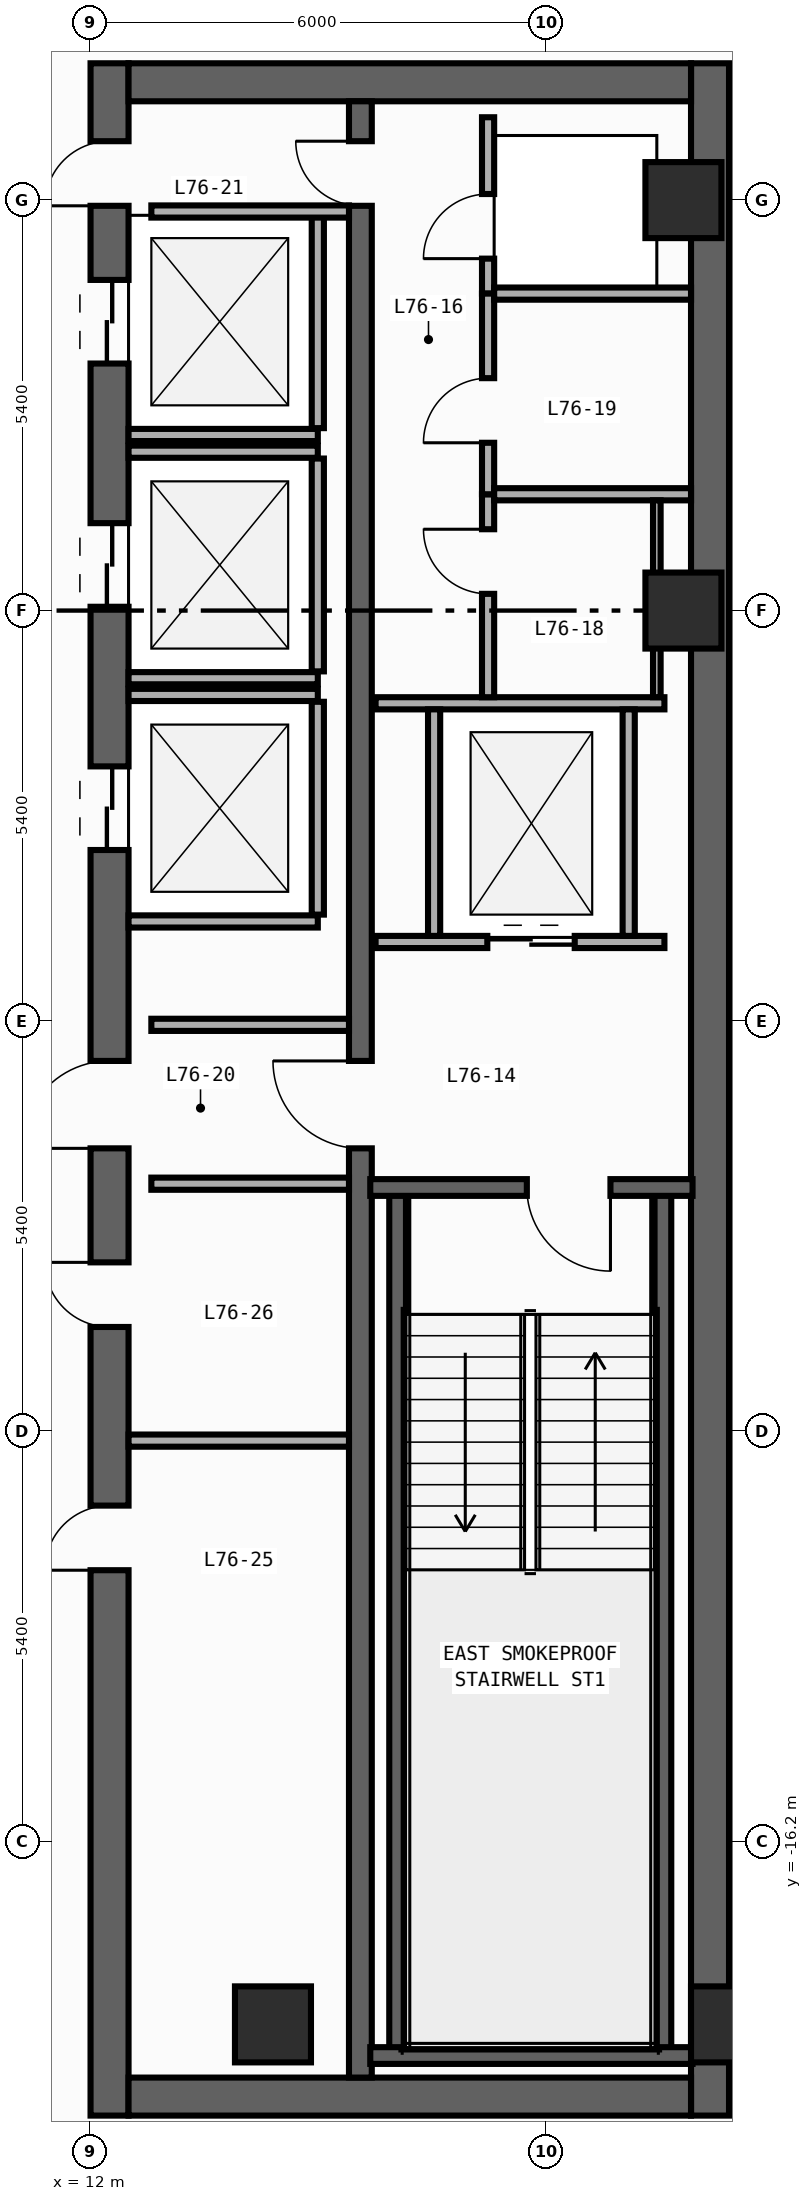
"""IFC4 building model, lengths in metres.
Left out: names, types, materials, properties, quantities, classifications, styles, units other than length and angle.
Written with IfcOpenShell. Run it as: python <this file> out.ifc"""

import sys

from ifc_helpers import new_model, si_unit, direction, frame, frame_2d, origin, origin_2d, place, context, subcontext, project, spatial, rectangle, circle, extrude, element, fill, save


model = new_model("IFC4")
c1 = context("Model", 3, precision=1e-05, world=origin(), true_north=direction((0.0, 1.0)))
c2 = subcontext(c1, "Body", "Model", "MODEL_VIEW")
j1 = project(units=[si_unit("LENGTHUNIT", "METRE"), si_unit("PLANEANGLEUNIT", "RADIAN")], contexts=[c1])
p1 = place(None, origin())
s1 = spatial("IfcSite", under=j1, at=p1, CompositionType="ELEMENT")
p2 = place(p1, origin())
s2 = spatial("IfcBuilding", under=s1, at=p2, CompositionType="ELEMENT")
p3 = place(p2, frame((0.0, 0.0, 315.6)))
s3 = spatial("IfcBuildingStorey", under=s2, at=p3, CompositionType="ELEMENT", Elevation=315.6)
p4 = place(p3, frame((12.25, -19.8, 0.0), z_axis=(0.0, 0.0, 1.0), x_axis=(0.0, 1.0, 0.0)))
e1 = element("IfcWall", 1, at=p4, inside=s3, PredefinedType="SHEAR", context=c2, shape_type="SweptSolid", body=[
    extrude(rectangle(XDim=27.0, YDim=0.5, at=frame_2d((13.5, 0.0))), origin(), (0.0, 0.0, 1.0), 4.54),
])
p5 = place(p4, frame((23.05, 0.0, 0.0)))
e2 = element("IfcOpeningElement", 2, at=p5, cuts=e1, PredefinedType="OPENING", context=c2, shape_type="SweptSolid", body=[
    extrude(rectangle(XDim=1.1, YDim=2.2, at=frame_2d((0.55, 1.1))), frame((0.0, 0.26, 0.0), z_axis=(0.0, -1.0, 0.0), x_axis=(1.0, 0.0, 0.0)), (0.0, 0.0, 1.0), 0.52),
])
p6 = place(p4, frame((19.85, 0.0, 0.0)))
e3 = element("IfcOpeningElement", 3, at=p6, cuts=e1, PredefinedType="OPENING", context=c2, shape_type="SweptSolid", body=[
    extrude(rectangle(XDim=1.1, YDim=2.2, at=frame_2d((0.55, 1.1))), frame((0.0, 0.26, 0.0), z_axis=(0.0, -1.0, 0.0), x_axis=(1.0, 0.0, 0.0)), (0.0, 0.0, 1.0), 0.52),
])
p7 = place(p4, frame((16.65, 0.0, 0.0)))
e4 = element("IfcOpeningElement", 4, at=p7, cuts=e1, PredefinedType="OPENING", context=c2, shape_type="SweptSolid", body=[
    extrude(rectangle(XDim=1.1, YDim=2.2, at=frame_2d((0.55, 1.1))), frame((0.0, 0.26, 0.0), z_axis=(0.0, -1.0, 0.0), x_axis=(1.0, 0.0, 0.0)), (0.0, 0.0, 1.0), 0.52),
])
p8 = place(p4, frame((7.175, 0.0, 0.0)))
e5 = element("IfcOpeningElement", 5, at=p8, cuts=e1, PredefinedType="OPENING", context=c2, shape_type="SweptSolid", body=[
    extrude(rectangle(XDim=0.85, YDim=2.1, at=frame_2d((0.425, 1.05))), frame((0.0, 0.26, 0.0), z_axis=(0.0, -1.0, 0.0), x_axis=(1.0, 0.0, 0.0)), (0.0, 0.0, 1.0), 0.52),
])
p9 = place(p4, frame((10.375, 0.0, 0.0)))
e6 = element("IfcOpeningElement", 6, at=p9, cuts=e1, PredefinedType="OPENING", context=c2, shape_type="SweptSolid", body=[
    extrude(rectangle(XDim=0.85, YDim=2.1, at=frame_2d((0.425, 1.05))), frame((0.0, 0.26, 0.0), z_axis=(0.0, -1.0, 0.0), x_axis=(1.0, 0.0, 0.0)), (0.0, 0.0, 1.0), 0.52),
])
p10 = place(p4, frame((12.725, 0.0, 0.0)))
e7 = element("IfcOpeningElement", 7, at=p10, cuts=e1, PredefinedType="OPENING", context=c2, shape_type="SweptSolid", body=[
    extrude(rectangle(XDim=1.15, YDim=2.2, at=frame_2d((0.575, 1.1))), frame((0.0, 0.26, 0.0), z_axis=(0.0, -1.0, 0.0), x_axis=(1.0, 0.0, 0.0)), (0.0, 0.0, 1.0), 0.52),
])
p11 = place(p4, frame((25.125, 0.0, 0.0)))
e8 = element("IfcOpeningElement", 8, at=p11, cuts=e1, PredefinedType="OPENING", context=c2, shape_type="SweptSolid", body=[
    extrude(rectangle(XDim=0.85, YDim=2.1, at=frame_2d((0.425, 1.05))), frame((0.0, 0.26, 0.0), z_axis=(0.0, -1.0, 0.0), x_axis=(1.0, 0.0, 0.0)), (0.0, 0.0, 1.0), 0.52),
])
p12 = place(p3, frame((20.15, -19.8, 0.0), z_axis=(0.0, 0.0, 1.0), x_axis=(0.0, 1.0, 0.0)))
e9 = element("IfcWall", 9, at=p12, inside=s3, PredefinedType="SHEAR", context=c2, shape_type="SweptSolid", body=[
    extrude(rectangle(XDim=27.0, YDim=0.5, at=frame_2d((13.5, 0.0))), origin(), (0.0, 0.0, 1.0), 4.54),
])
for number, where, z_axis, x_axis in (
    (10, (12.5, -19.55, 0.0), (0.0, 0.0, 1.0), (1.0, 0.0, 0.0)),
    (11, (12.5, 6.95, 0.0), (0.0, 0.0, 1.0), (1.0, 0.0, 0.0)),
):
    element("IfcWall", number, at=place(p3, frame(where, z_axis=z_axis, x_axis=x_axis)), inside=s3, PredefinedType="SHEAR", context=c2, shape_type="SweptSolid", body=[
        extrude(rectangle(XDim=7.4, YDim=0.5, at=frame_2d((3.7, 0.0))), origin(), (0.0, 0.0, 1.0), 4.54),
    ])
p13 = place(p3, frame((15.55, -19.3, 0.0), z_axis=(0.0, 0.0, 1.0), x_axis=(0.0, 1.0, 0.0)))
e12 = element("IfcWall", 12, at=p13, inside=s3, PredefinedType="SHEAR", context=c2, shape_type="SweptSolid", body=[
    extrude(rectangle(XDim=26.0, YDim=0.3, at=frame_2d((13.0, 0.0))), origin(), (0.0, 0.0, 1.0), 4.54),
])
p14 = place(p13, frame((12.225, 0.0, 0.0)))
e13 = element("IfcOpeningElement", 13, at=p14, cuts=e12, PredefinedType="OPENING", context=c2, shape_type="SweptSolid", body=[
    extrude(rectangle(XDim=1.15, YDim=2.2, at=frame_2d((0.575, 1.1))), frame((0.0, 0.16, 0.0), z_axis=(0.0, -1.0, 0.0), x_axis=(1.0, 0.0, 0.0)), (0.0, 0.0, 1.0), 0.32),
])
p15 = place(p13, frame((24.625, 0.0, 0.0)))
e14 = element("IfcOpeningElement", 14, at=p15, cuts=e12, PredefinedType="OPENING", context=c2, shape_type="SweptSolid", body=[
    extrude(rectangle(XDim=0.85, YDim=2.1, at=frame_2d((0.425, 1.05))), frame((0.0, 0.16, 0.0), z_axis=(0.0, -1.0, 0.0), x_axis=(1.0, 0.0, 0.0)), (0.0, 0.0, 1.0), 0.32),
])
for number, where, z_axis, x_axis in (
    (15, (16.04, -19.01, 0.0), (0.0, 0.0, 1.0), (0.0, 1.0, 0.0)),
    (16, (19.53, -19.01, 0.0), (0.0, 0.0, 1.0), (0.0, 1.0, 0.0)),
):
    element("IfcWall", number, at=place(p3, frame(where, z_axis=z_axis, x_axis=x_axis)), inside=s3, PredefinedType="SHEAR", context=c2, shape_type="SweptSolid", body=[
        extrude(rectangle(XDim=11.42, YDim=0.22, at=frame_2d((5.71, 0.0))), origin(), (0.0, 0.0, 1.0), 4.54),
    ])
p16 = place(p3, frame((15.68, -19.01, 0.0), z_axis=(0.0, 0.0, 1.0), x_axis=(1.0, 0.0, 0.0)))
e17 = element("IfcWall", 17, at=p16, inside=s3, PredefinedType="SHEAR", context=c2, shape_type="SweptSolid", body=[
    extrude(rectangle(XDim=4.24, YDim=0.22, at=frame_2d((2.12, 0.0))), origin(), (0.0, 0.0, 1.0), 4.54),
])
p17 = place(p3, frame((19.92, -7.59, 0.0), z_axis=(0.0, 0.0, 1.0), x_axis=(-1.0, 0.0, 0.0)))
e18 = element("IfcWall", 18, at=p17, inside=s3, PredefinedType="SHEAR", context=c2, shape_type="SweptSolid", body=[
    extrude(rectangle(XDim=4.24, YDim=0.22, at=frame_2d((2.12, 0.0))), origin(), (0.0, 0.0, 1.0), 4.54),
])
p18 = place(p17, frame((1.08, 0.0, 0.0)))
e19 = element("IfcOpeningElement", 19, at=p18, cuts=e18, PredefinedType="OPENING", context=c2, shape_type="SweptSolid", body=[
    extrude(rectangle(XDim=1.1, YDim=2.2, at=frame_2d((0.55, 1.1))), frame((0.0, 0.12, 0.0), z_axis=(0.0, -1.0, 0.0), x_axis=(1.0, 0.0, 0.0)), (0.0, 0.0, 1.0), 0.24),
])
for number, where, z_axis, x_axis in (
    (20, (20.4, -18.6, 0.0), (0.0, 0.0, 1.0), (1.0, 0.0, 0.0)),
    (21, (14.4, -18.6, 0.0), (0.0, 0.0, 1.0), (1.0, 0.0, 0.0)),
    (22, (19.8, 0.0, 0.0), (0.0, 0.0, 1.0), (1.0, 0.0, 0.0)),
    (23, (19.8, 5.4, 0.0), (0.0, 0.0, 1.0), (1.0, 0.0, 0.0)),
):
    element("IfcColumn", number, at=place(p3, frame(where, z_axis=z_axis, x_axis=x_axis)), inside=s3, PredefinedType="COLUMN", context=c2, shape_type="SweptSolid", body=[
        extrude(circle(Radius=0.5, at=origin_2d()), origin(), (0.0, 0.0, 1.0), 4.8),
    ])
p19 = place(p3, frame((12.5, 2.31, 0.0), z_axis=(0.0, 0.0, 1.0), x_axis=(1.0, 0.0, 0.0)))
e24 = element("IfcWall", 24, at=p19, inside=s3, PredefinedType="STANDARD", context=c2, shape_type="SweptSolid", body=[
    extrude(rectangle(XDim=2.49, YDim=0.16, at=frame_2d((1.245, 0.0))), origin(), (0.0, 0.0, 1.0), 4.54),
])
p20 = place(p3, frame((14.99, 2.4, 0.0), z_axis=(0.0, 0.0, 1.0), x_axis=(0.0, 1.0, 0.0)))
e25 = element("IfcWall", 25, at=p20, inside=s3, PredefinedType="STANDARD", context=c2, shape_type="SweptSolid", body=[
    extrude(rectangle(XDim=2.8, YDim=0.16, at=frame_2d((1.4, 0.0))), origin(), (0.0, 0.0, 1.0), 4.54),
])
for number, where, z_axis, x_axis in (
    (26, (12.5, -0.89, 0.0), (0.0, 0.0, 1.0), (1.0, 0.0, 0.0)),
    (27, (12.5, 2.09, 0.0), (0.0, 0.0, 1.0), (1.0, 0.0, 0.0)),
):
    element("IfcWall", number, at=place(p3, frame(where, z_axis=z_axis, x_axis=x_axis)), inside=s3, PredefinedType="STANDARD", context=c2, shape_type="SweptSolid", body=[
        extrude(rectangle(XDim=2.49, YDim=0.16, at=frame_2d((1.245, 0.0))), origin(), (0.0, 0.0, 1.0), 4.54),
    ])
p21 = place(p3, frame((14.99, -0.8, 0.0), z_axis=(0.0, 0.0, 1.0), x_axis=(0.0, 1.0, 0.0)))
e28 = element("IfcWall", 28, at=p21, inside=s3, PredefinedType="STANDARD", context=c2, shape_type="SweptSolid", body=[
    extrude(rectangle(XDim=2.8, YDim=0.16, at=frame_2d((1.4, 0.0))), origin(), (0.0, 0.0, 1.0), 4.54),
])
for number, where, z_axis, x_axis in (
    (29, (12.5, -4.09, 0.0), (0.0, 0.0, 1.0), (1.0, 0.0, 0.0)),
    (30, (12.5, -1.11, 0.0), (0.0, 0.0, 1.0), (1.0, 0.0, 0.0)),
):
    element("IfcWall", number, at=place(p3, frame(where, z_axis=z_axis, x_axis=x_axis)), inside=s3, PredefinedType="STANDARD", context=c2, shape_type="SweptSolid", body=[
        extrude(rectangle(XDim=2.49, YDim=0.16, at=frame_2d((1.245, 0.0))), origin(), (0.0, 0.0, 1.0), 4.54),
    ])
p22 = place(p3, frame((14.99, -4.0, 0.0), z_axis=(0.0, 0.0, 1.0), x_axis=(0.0, 1.0, 0.0)))
e31 = element("IfcWall", 31, at=p22, inside=s3, PredefinedType="STANDARD", context=c2, shape_type="SweptSolid", body=[
    extrude(rectangle(XDim=2.8, YDim=0.16, at=frame_2d((1.4, 0.0))), origin(), (0.0, 0.0, 1.0), 4.54),
])
p23 = place(p3, frame((15.75, -4.36, 0.0), z_axis=(0.0, 0.0, 1.0), x_axis=(1.0, 0.0, 0.0)))
e32 = element("IfcWall", 32, at=p23, inside=s3, PredefinedType="STANDARD", context=c2, shape_type="SweptSolid", body=[
    extrude(rectangle(XDim=3.8, YDim=0.16, at=frame_2d((1.9, 0.0))), origin(), (0.0, 0.0, 1.0), 4.54),
])
p24 = place(p23, frame((1.47, 0.0, 0.0)))
e33 = element("IfcOpeningElement", 33, at=p24, cuts=e32, PredefinedType="OPENING", context=c2, shape_type="SweptSolid", body=[
    extrude(rectangle(XDim=1.15, YDim=2.2, at=frame_2d((0.575, 1.1))), frame((0.0, 0.09, 0.0), z_axis=(0.0, -1.0, 0.0), x_axis=(1.0, 0.0, 0.0)), (0.0, 0.0, 1.0), 0.18),
])
p25 = place(p3, frame((15.75, -1.22, 0.0), z_axis=(0.0, 0.0, 1.0), x_axis=(1.0, 0.0, 0.0)))
e34 = element("IfcWall", 34, at=p25, inside=s3, PredefinedType="STANDARD", context=c2, shape_type="SweptSolid", body=[
    extrude(rectangle(XDim=3.8, YDim=0.16, at=frame_2d((1.9, 0.0))), origin(), (0.0, 0.0, 1.0), 4.54),
])
for number, where, z_axis, x_axis in (
    (35, (16.52, -4.28, 0.0), (0.0, 0.0, 1.0), (0.0, 1.0, 0.0)),
    (36, (19.08, -4.28, 0.0), (0.0, 0.0, 1.0), (0.0, 1.0, 0.0)),
):
    element("IfcWall", number, at=place(p3, frame(where, z_axis=z_axis, x_axis=x_axis)), inside=s3, PredefinedType="STANDARD", context=c2, shape_type="SweptSolid", body=[
        extrude(rectangle(XDim=2.98, YDim=0.16, at=frame_2d((1.49, 0.0))), origin(), (0.0, 0.0, 1.0), 4.54),
    ])
for number, where, z_axis, x_axis in (
    (37, (12.8, -5.45, 0.0), (0.0, 0.0, 1.0), (1.0, 0.0, 0.0)),
    (38, (12.8, -7.54, 0.0), (0.0, 0.0, 1.0), (1.0, 0.0, 0.0)),
    (39, (12.8, 5.25, 0.0), (0.0, 0.0, 1.0), (1.0, 0.0, 0.0)),
):
    element("IfcWall", number, at=place(p3, frame(where, z_axis=z_axis, x_axis=x_axis)), inside=s3, PredefinedType="STANDARD", context=c2, shape_type="SweptSolid", body=[
        extrude(rectangle(XDim=2.6, YDim=0.16, at=frame_2d((1.3, 0.0))), origin(), (0.0, 0.0, 1.0), 4.54),
    ])
p26 = place(p3, frame((17.23, 4.17, 0.0), z_axis=(0.0, 0.0, 1.0), x_axis=(0.0, 1.0, 0.0)))
e40 = element("IfcWall", 40, at=p26, inside=s3, PredefinedType="PARTITIONING", context=c2, shape_type="SweptSolid", body=[
    extrude(rectangle(XDim=2.32, YDim=0.16, at=frame_2d((1.16, 0.0))), origin(), (0.0, 0.0, 1.0), 4.54),
])
p27 = place(p26, frame((0.46, 0.0, 0.0)))
e41 = element("IfcOpeningElement", 41, at=p27, cuts=e40, PredefinedType="OPENING", context=c2, shape_type="SweptSolid", body=[
    extrude(rectangle(XDim=0.85, YDim=2.1, at=frame_2d((0.425, 1.05))), frame((0.0, 0.09, 0.0), z_axis=(0.0, -1.0, 0.0), x_axis=(1.0, 0.0, 0.0)), (0.0, 0.0, 1.0), 0.18),
])
p28 = place(p3, frame((17.23, -1.14, 0.0), z_axis=(0.0, 0.0, 1.0), x_axis=(0.0, 1.0, 0.0)))
e42 = element("IfcWall", 42, at=p28, inside=s3, PredefinedType="PARTITIONING", context=c2, shape_type="SweptSolid", body=[
    extrude(rectangle(XDim=2.67, YDim=0.16, at=frame_2d((1.335, 0.0))), origin(), (0.0, 0.0, 1.0), 4.54),
])
p29 = place(p28, frame((1.36, 0.0, 0.0)))
e43 = element("IfcOpeningElement", 43, at=p29, cuts=e42, PredefinedType="OPENING", context=c2, shape_type="SweptSolid", body=[
    extrude(rectangle(XDim=0.85, YDim=2.1, at=frame_2d((0.425, 1.05))), frame((0.0, 0.09, 0.0), z_axis=(0.0, -1.0, 0.0), x_axis=(1.0, 0.0, 0.0)), (0.0, 0.0, 1.0), 0.18),
])
p30 = place(p3, frame((17.23, 1.53, 0.0), z_axis=(0.0, 0.0, 1.0), x_axis=(0.0, 1.0, 0.0)))
e44 = element("IfcWall", 44, at=p30, inside=s3, PredefinedType="PARTITIONING", context=c2, shape_type="SweptSolid", body=[
    extrude(rectangle(XDim=2.64, YDim=0.16, at=frame_2d((1.32, 0.0))), origin(), (0.0, 0.0, 1.0), 4.54),
])
p31 = place(p30, frame((0.677, 0.0, 0.0)))
e45 = element("IfcOpeningElement", 45, at=p31, cuts=e44, PredefinedType="OPENING", context=c2, shape_type="SweptSolid", body=[
    extrude(rectangle(XDim=0.85, YDim=2.1, at=frame_2d((0.425, 1.05))), frame((0.0, 0.09, 0.0), z_axis=(0.0, -1.0, 0.0), x_axis=(1.0, 0.0, 0.0)), (0.0, 0.0, 1.0), 0.18),
])
for number, where, z_axis, x_axis in (
    (46, (17.31, 4.17, 0.0), (0.0, 0.0, 1.0), (1.0, 0.0, 0.0)),
    (47, (17.31, 1.53, 0.0), (0.0, 0.0, 1.0), (1.0, 0.0, 0.0)),
):
    element("IfcWall", number, at=place(p3, frame(where, z_axis=z_axis, x_axis=x_axis)), inside=s3, PredefinedType="PARTITIONING", context=c2, shape_type="SweptSolid", body=[
        extrude(rectangle(XDim=2.59, YDim=0.16, at=frame_2d((1.295, 0.0))), origin(), (0.0, 0.0, 1.0), 4.54),
    ])
p32 = place(p3, frame((12.5, -10.92, 0.0), z_axis=(0.0, 0.0, 1.0), x_axis=(1.0, 0.0, 0.0)))
e48 = element("IfcWall", 48, at=p32, inside=s3, PredefinedType="PARTITIONING", context=c2, shape_type="SweptSolid", body=[
    extrude(rectangle(XDim=2.9, YDim=0.16, at=frame_2d((1.45, 0.0))), origin(), (0.0, 0.0, 1.0), 3.64),
])
p33 = place(p3, frame((19.45, 1.45, 0.0), z_axis=(0.0, 0.0, 1.0), x_axis=(0.0, -1.0, 0.0)))
e49 = element("IfcWall", 49, at=p33, inside=s3, PredefinedType="PARTITIONING", context=c2, shape_type="SweptSolid", body=[
    extrude(rectangle(XDim=2.59, YDim=0.1, at=frame_2d((1.295, 0.0))), origin(), (0.0, 0.0, 1.0), 4.54),
])
p34 = place(p18, origin())
e50 = element("IfcDoor", 50, at=p34, inside=s3, OperationType="SINGLE_SWING_LEFT", PredefinedType="DOOR", context=c2, shape_type="SweptSolid", body=[
    extrude(rectangle(XDim=1.1, YDim=2.2, at=frame_2d((0.55, 1.1))), frame((0.0, 0.025, 0.0), z_axis=(0.0, -1.0, 0.0), x_axis=(1.0, 0.0, 0.0)), (0.0, 0.0, 1.0), 0.05),
])
fill(e19, e50)
p35 = place(p5, origin())
e51 = element("IfcDoor", 51, at=p35, inside=s3, OperationType="DOUBLE_DOOR_SLIDING", PredefinedType="DOOR", context=c2, shape_type="SweptSolid", body=[
    extrude(rectangle(XDim=1.1, YDim=2.2, at=frame_2d((0.55, 1.1))), frame((0.0, 0.025, 0.0), z_axis=(0.0, -1.0, 0.0), x_axis=(1.0, 0.0, 0.0)), (0.0, 0.0, 1.0), 0.05),
])
fill(e2, e51)
p36 = place(p6, origin())
e52 = element("IfcDoor", 52, at=p36, inside=s3, OperationType="DOUBLE_DOOR_SLIDING", PredefinedType="DOOR", context=c2, shape_type="SweptSolid", body=[
    extrude(rectangle(XDim=1.1, YDim=2.2, at=frame_2d((0.55, 1.1))), frame((0.0, 0.025, 0.0), z_axis=(0.0, -1.0, 0.0), x_axis=(1.0, 0.0, 0.0)), (0.0, 0.0, 1.0), 0.05),
])
fill(e3, e52)
p37 = place(p7, origin())
e53 = element("IfcDoor", 53, at=p37, inside=s3, OperationType="DOUBLE_DOOR_SLIDING", PredefinedType="DOOR", context=c2, shape_type="SweptSolid", body=[
    extrude(rectangle(XDim=1.1, YDim=2.2, at=frame_2d((0.55, 1.1))), frame((0.0, 0.025, 0.0), z_axis=(0.0, -1.0, 0.0), x_axis=(1.0, 0.0, 0.0)), (0.0, 0.0, 1.0), 0.05),
])
fill(e4, e53)
p38 = place(p8, origin())
e54 = element("IfcDoor", 54, at=p38, inside=s3, OperationType="SINGLE_SWING_LEFT", PredefinedType="DOOR", context=c2, shape_type="SweptSolid", body=[
    extrude(rectangle(XDim=0.85, YDim=2.1, at=frame_2d((0.425, 1.05))), frame((0.0, 0.025, 0.0), z_axis=(0.0, -1.0, 0.0), x_axis=(1.0, 0.0, 0.0)), (0.0, 0.0, 1.0), 0.05),
])
fill(e5, e54)
p39 = place(p9, origin())
e55 = element("IfcDoor", 55, at=p39, inside=s3, OperationType="SINGLE_SWING_RIGHT", PredefinedType="DOOR", context=c2, shape_type="SweptSolid", body=[
    extrude(rectangle(XDim=0.85, YDim=2.1, at=frame_2d((0.425, 1.05))), frame((0.0, 0.025, 0.0), z_axis=(0.0, -1.0, 0.0), x_axis=(1.0, 0.0, 0.0)), (0.0, 0.0, 1.0), 0.05),
])
fill(e6, e55)
p40 = place(p10, origin())
e56 = element("IfcDoor", 56, at=p40, inside=s3, OperationType="SINGLE_SWING_LEFT", PredefinedType="DOOR", context=c2, shape_type="SweptSolid", body=[
    extrude(rectangle(XDim=1.15, YDim=2.2, at=frame_2d((0.575, 1.1))), frame((0.0, 0.025, 0.0), z_axis=(0.0, -1.0, 0.0), x_axis=(1.0, 0.0, 0.0)), (0.0, 0.0, 1.0), 0.05),
])
fill(e7, e56)
p41 = place(p14, origin())
e57 = element("IfcDoor", 57, at=p41, inside=s3, OperationType="SINGLE_SWING_RIGHT", PredefinedType="DOOR", context=c2, shape_type="SweptSolid", body=[
    extrude(rectangle(XDim=1.15, YDim=2.2, at=frame_2d((0.575, 1.1))), frame((0.0, 0.025, 0.0), z_axis=(0.0, -1.0, 0.0), x_axis=(1.0, 0.0, 0.0)), (0.0, 0.0, 1.0), 0.05),
])
fill(e13, e57)
p42 = place(p11, origin())
e58 = element("IfcDoor", 58, at=p42, inside=s3, OperationType="SINGLE_SWING_LEFT", PredefinedType="DOOR", context=c2, shape_type="SweptSolid", body=[
    extrude(rectangle(XDim=0.85, YDim=2.1, at=frame_2d((0.425, 1.05))), frame((0.0, 0.025, 0.0), z_axis=(0.0, -1.0, 0.0), x_axis=(1.0, 0.0, 0.0)), (0.0, 0.0, 1.0), 0.05),
])
fill(e8, e58)
p43 = place(p15, origin())
e59 = element("IfcDoor", 59, at=p43, inside=s3, OperationType="SINGLE_SWING_RIGHT", PredefinedType="DOOR", context=c2, shape_type="SweptSolid", body=[
    extrude(rectangle(XDim=0.85, YDim=2.1, at=frame_2d((0.425, 1.05))), frame((0.0, 0.025, 0.0), z_axis=(0.0, -1.0, 0.0), x_axis=(1.0, 0.0, 0.0)), (0.0, 0.0, 1.0), 0.05),
])
fill(e14, e59)
p44 = place(p24, origin())
e60 = element("IfcDoor", 60, at=p44, inside=s3, OperationType="DOUBLE_DOOR_SLIDING", PredefinedType="DOOR", context=c2, shape_type="SweptSolid", body=[
    extrude(rectangle(XDim=1.15, YDim=2.2, at=frame_2d((0.575, 1.1))), frame((0.0, 0.025, 0.0), z_axis=(0.0, -1.0, 0.0), x_axis=(1.0, 0.0, 0.0)), (0.0, 0.0, 1.0), 0.05),
])
fill(e33, e60)
p45 = place(p27, origin())
e61 = element("IfcDoor", 61, at=p45, inside=s3, OperationType="SINGLE_SWING_LEFT", PredefinedType="DOOR", context=c2, shape_type="SweptSolid", body=[
    extrude(rectangle(XDim=0.85, YDim=2.1, at=frame_2d((0.425, 1.05))), frame((0.0, 0.025, 0.0), z_axis=(0.0, -1.0, 0.0), x_axis=(1.0, 0.0, 0.0)), (0.0, 0.0, 1.0), 0.05),
])
fill(e41, e61)
p46 = place(p29, origin())
e62 = element("IfcDoor", 62, at=p46, inside=s3, OperationType="SINGLE_SWING_RIGHT", PredefinedType="DOOR", context=c2, shape_type="SweptSolid", body=[
    extrude(rectangle(XDim=0.85, YDim=2.1, at=frame_2d((0.425, 1.05))), frame((0.0, 0.025, 0.0), z_axis=(0.0, -1.0, 0.0), x_axis=(1.0, 0.0, 0.0)), (0.0, 0.0, 1.0), 0.05),
])
fill(e43, e62)
p47 = place(p31, origin())
e63 = element("IfcDoor", 63, at=p47, inside=s3, OperationType="SINGLE_SWING_LEFT", PredefinedType="DOOR", context=c2, shape_type="SweptSolid", body=[
    extrude(rectangle(XDim=0.85, YDim=2.1, at=frame_2d((0.425, 1.05))), frame((0.0, 0.025, 0.0), z_axis=(0.0, -1.0, 0.0), x_axis=(1.0, 0.0, 0.0)), (0.0, 0.0, 1.0), 0.05),
])
fill(e45, e63)
save(model, sys.argv[1])
